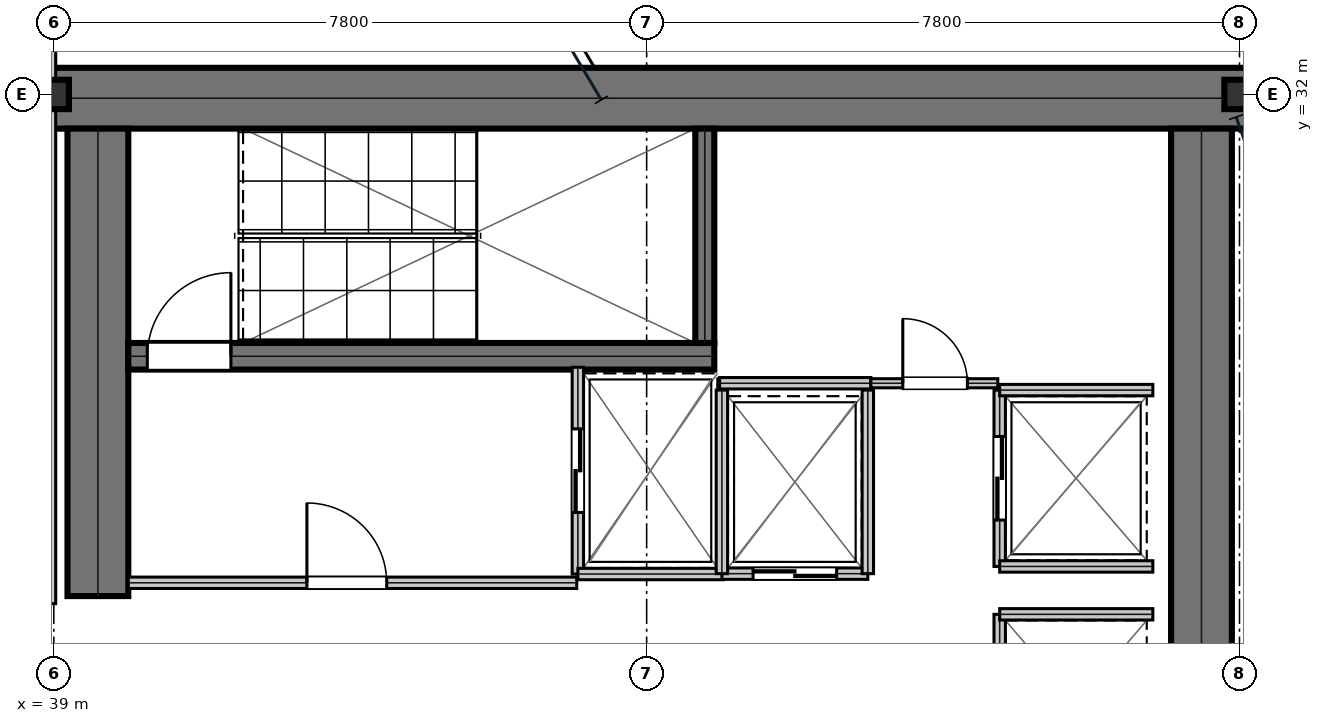
"""IFC4 building model, lengths in metres.
Left out: names, types, materials, properties, quantities, classifications, styles, units other than length and angle.
Written with IfcOpenShell. Run it as: python <this file> out.ifc"""

import sys

from ifc_helpers import new_model, si_unit, direction, frame, frame_2d, origin, origin_2d, place, context, subcontext, project, spatial, rectangle, i_section, extrude, element, fill, save


model = new_model("IFC4")
c1 = context("Model", 3, precision=1e-05, world=origin(), true_north=direction((0.0, 1.0)))
c2 = subcontext(c1, "Body", "Model", "MODEL_VIEW")
j1 = project(units=[si_unit("LENGTHUNIT", "METRE"), si_unit("PLANEANGLEUNIT", "RADIAN")], contexts=[c1])
p1 = place(None, origin())
s1 = spatial("IfcSite", under=j1, at=p1, CompositionType="ELEMENT")
p2 = place(p1, origin())
s2 = spatial("IfcBuilding", under=s1, at=p2, CompositionType="ELEMENT")
p3 = place(p2, frame((0.0, 0.0, 177.6)))
s3 = spatial("IfcBuildingStorey", under=s2, at=p3, CompositionType="ELEMENT", Elevation=177.6)
p4 = place(p3, frame((38.8, 31.95, 0.0), z_axis=(0.0, 0.0, 1.0), x_axis=(1.0, 0.0, 0.0)))
e1 = element("IfcWall", 1, at=p4, inside=s3, PredefinedType="SHEAR", context=c2, shape_type="SweptSolid", body=[
    extrude(rectangle(XDim=16.0, YDim=0.8, at=frame_2d((8.0, 0.0))), origin(), (0.0, 0.0, 1.0), 3.73),
])
p5 = place(p3, frame((39.58, 25.4, 0.0), z_axis=(0.0, 0.0, 1.0), x_axis=(0.0, 1.0, 0.0)))
e2 = element("IfcWall", 2, at=p5, inside=s3, PredefinedType="SHEAR", context=c2, shape_type="SweptSolid", body=[
    extrude(rectangle(XDim=6.15, YDim=0.8, at=frame_2d((3.075, 0.0))), origin(), (0.0, 0.0, 1.0), 3.73),
])
p6 = place(p3, frame((54.1, 16.45, 0.0), z_axis=(0.0, 0.0, 1.0), x_axis=(0.0, 1.0, 0.0)))
e3 = element("IfcWall", 3, at=p6, inside=s3, PredefinedType="SHEAR", context=c2, shape_type="SweptSolid", body=[
    extrude(rectangle(XDim=15.1, YDim=0.8, at=frame_2d((7.55, 0.0))), origin(), (0.0, 0.0, 1.0), 3.73),
])
p7 = place(p3, frame((39.98, 28.555, 0.0), z_axis=(0.0, 0.0, 1.0), x_axis=(1.0, 0.0, 0.0)))
e4 = element("IfcWall", 4, at=p7, inside=s3, PredefinedType="SHEAR", context=c2, shape_type="SweptSolid", body=[
    extrude(rectangle(XDim=7.71, YDim=0.35, at=frame_2d((3.855, 0.0))), origin(), (0.0, 0.0, 1.0), 3.73),
])
p8 = place(p7, frame((0.25, 0.0, 0.0)))
e5 = element("IfcOpeningElement", 5, at=p8, cuts=e4, PredefinedType="OPENING", context=c2, shape_type="SweptSolid", body=[
    extrude(rectangle(XDim=1.1, YDim=2.15, at=frame_2d((0.55, 1.075))), frame((0.0, 0.185, 0.0), z_axis=(0.0, -1.0, 0.0), x_axis=(1.0, 0.0, 0.0)), (0.0, 0.0, 1.0), 0.37),
])
p9 = place(p3, frame((47.565, 28.73, 0.0), z_axis=(0.0, 0.0, 1.0), x_axis=(0.0, 1.0, 0.0)))
e6 = element("IfcWall", 6, at=p9, inside=s3, PredefinedType="SHEAR", context=c2, shape_type="SweptSolid", body=[
    extrude(rectangle(XDim=2.82, YDim=0.25, at=frame_2d((1.41, 0.0))), origin(), (0.0, 0.0, 1.0), 3.73),
])
for number, where, z_axis, x_axis in (
    (7, (39.0, 32.0, 0.0), (0.0, 0.0, 1.0), (1.0, 0.0, 0.0)),
    (8, (54.6, 32.0, 0.0), (0.0, 0.0, 1.0), (1.0, 0.0, 0.0)),
):
    element("IfcColumn", number, at=place(p3, frame(where, z_axis=z_axis, x_axis=x_axis)), inside=s3, PredefinedType="COLUMN", context=c2, shape_type="SweptSolid", body=[
        extrude(i_section(OverallWidth=0.398, OverallDepth=0.387, WebThickness=0.021, FlangeThickness=0.033, at=origin_2d()), origin(), (0.0, 0.0, 1.0), 4.044),
    ])
p10 = place(p3, frame((39.98, 25.575, 0.0), z_axis=(0.0, 0.0, 1.0), x_axis=(1.0, 0.0, 0.0)))
e9 = element("IfcWall", 9, at=p10, inside=s3, PredefinedType="PARTITIONING", context=c2, shape_type="SweptSolid", body=[
    extrude(rectangle(XDim=5.9, YDim=0.15, at=frame_2d((2.95, 0.0))), origin(), (0.0, 0.0, 1.0), 3.73),
])
p11 = place(p10, frame((2.35, 0.0, 0.0)))
e10 = element("IfcOpeningElement", 10, at=p11, cuts=e9, PredefinedType="OPENING", context=c2, shape_type="SweptSolid", body=[
    extrude(rectangle(XDim=1.05, YDim=2.15, at=frame_2d((0.525, 1.075))), frame((0.0, 0.085, 0.0), z_axis=(0.0, -1.0, 0.0), x_axis=(1.0, 0.0, 0.0)), (0.0, 0.0, 1.0), 0.17),
])
p12 = place(p3, frame((45.895, 25.69, 0.0), z_axis=(0.0, 0.0, 1.0), x_axis=(0.0, 1.0, 0.0)))
e11 = element("IfcWall", 11, at=p12, inside=s3, PredefinedType="PARTITIONING", context=c2, shape_type="SweptSolid", body=[
    extrude(rectangle(XDim=2.72, YDim=0.15, at=frame_2d((1.36, 0.0))), origin(), (0.0, 0.0, 1.0), 3.73),
])
p13 = place(p12, frame((0.81, 0.0, 0.0)))
e12 = element("IfcOpeningElement", 12, at=p13, cuts=e11, PredefinedType="OPENING", context=c2, shape_type="SweptSolid", body=[
    extrude(rectangle(XDim=1.1, YDim=2.15, at=frame_2d((0.55, 1.075))), frame((0.0, 0.085, 0.0), z_axis=(0.0, -1.0, 0.0), x_axis=(1.0, 0.0, 0.0)), (0.0, 0.0, 1.0), 0.17),
])
p14 = place(p3, frame((45.895, 25.69, 0.0), z_axis=(0.0, 0.0, 1.0), x_axis=(1.0, 0.0, 0.0)))
e13 = element("IfcWall", 13, at=p14, inside=s3, PredefinedType="PARTITIONING", context=c2, shape_type="SweptSolid", body=[
    extrude(rectangle(XDim=1.915, YDim=0.15, at=frame_2d((0.958, 0.0))), origin(), (0.0, 0.0, 1.0), 3.73),
])
p15 = place(p3, frame((47.79, 25.695, 0.0), z_axis=(0.0, 0.0, 1.0), x_axis=(1.0, 0.0, 0.0)))
e14 = element("IfcWall", 14, at=p15, inside=s3, PredefinedType="PARTITIONING", context=c2, shape_type="SweptSolid", body=[
    extrude(rectangle(XDim=1.92, YDim=0.15, at=frame_2d((0.96, 0.0))), origin(), (0.0, 0.0, 1.0), 3.73),
])
p16 = place(p15, frame((0.41, 0.0, 0.0)))
e15 = element("IfcOpeningElement", 15, at=p16, cuts=e14, PredefinedType="OPENING", context=c2, shape_type="SweptSolid", body=[
    extrude(rectangle(XDim=1.1, YDim=2.15, at=frame_2d((0.55, 1.075))), frame((0.0, 0.085, 0.0), z_axis=(0.0, -1.0, 0.0), x_axis=(1.0, 0.0, 0.0)), (0.0, 0.0, 1.0), 0.17),
])
for number, where, z_axis, x_axis in (
    (16, (47.79, 25.695, 0.0), (0.0, 0.0, 1.0), (0.0, 1.0, 0.0)),
    (17, (49.71, 25.695, 0.0), (0.0, 0.0, 1.0), (0.0, 1.0, 0.0)),
):
    element("IfcWall", number, at=place(p3, frame(where, z_axis=z_axis, x_axis=x_axis)), inside=s3, PredefinedType="PARTITIONING", context=c2, shape_type="SweptSolid", body=[
        extrude(rectangle(XDim=2.415, YDim=0.15, at=frame_2d((1.208, 0.0))), origin(), (0.0, 0.0, 1.0), 3.73),
    ])
p17 = place(p3, frame((51.445, 25.79, 0.0), z_axis=(0.0, 0.0, 1.0), x_axis=(0.0, 1.0, 0.0)))
e18 = element("IfcWall", 18, at=p17, inside=s3, PredefinedType="PARTITIONING", context=c2, shape_type="SweptSolid", body=[
    extrude(rectangle(XDim=2.32, YDim=0.15, at=frame_2d((1.16, 0.0))), origin(), (0.0, 0.0, 1.0), 3.73),
])
p18 = place(p17, frame((0.61, 0.0, 0.0)))
e19 = element("IfcOpeningElement", 19, at=p18, cuts=e18, PredefinedType="OPENING", context=c2, shape_type="SweptSolid", body=[
    extrude(rectangle(XDim=1.1, YDim=2.15, at=frame_2d((0.55, 1.075))), frame((0.0, 0.085, 0.0), z_axis=(0.0, -1.0, 0.0), x_axis=(1.0, 0.0, 0.0)), (0.0, 0.0, 1.0), 0.17),
])
for number, where, z_axis, x_axis in (
    (20, (51.445, 25.79, 0.0), (0.0, 0.0, 1.0), (1.0, 0.0, 0.0)),
    (21, (51.445, 28.11, 0.0), (0.0, 0.0, 1.0), (1.0, 0.0, 0.0)),
):
    element("IfcWall", number, at=place(p3, frame(where, z_axis=z_axis, x_axis=x_axis)), inside=s3, PredefinedType="PARTITIONING", context=c2, shape_type="SweptSolid", body=[
        extrude(rectangle(XDim=2.015, YDim=0.15, at=frame_2d((1.007, 0.0))), origin(), (0.0, 0.0, 1.0), 3.73),
    ])
p19 = place(p3, frame((51.445, 22.84, 0.0), z_axis=(0.0, 0.0, 1.0), x_axis=(0.0, 1.0, 0.0)))
e22 = element("IfcWall", 22, at=p19, inside=s3, PredefinedType="PARTITIONING", context=c2, shape_type="SweptSolid", body=[
    extrude(rectangle(XDim=2.32, YDim=0.15, at=frame_2d((1.16, 0.0))), origin(), (0.0, 0.0, 1.0), 3.73),
])
p20 = place(p3, frame((51.445, 25.16, 0.0), z_axis=(0.0, 0.0, 1.0), x_axis=(1.0, 0.0, 0.0)))
e23 = element("IfcWall", 23, at=p20, inside=s3, PredefinedType="PARTITIONING", context=c2, shape_type="SweptSolid", body=[
    extrude(rectangle(XDim=2.015, YDim=0.15, at=frame_2d((1.007, 0.0))), origin(), (0.0, 0.0, 1.0), 3.73),
])
p21 = place(p3, frame((47.76, 28.2, 0.0), z_axis=(0.0, 0.0, 1.0), x_axis=(1.0, 0.0, 0.0)))
e24 = element("IfcWall", 24, at=p21, inside=s3, PredefinedType="PARTITIONING", context=c2, shape_type="SweptSolid", body=[
    extrude(rectangle(XDim=1.99, YDim=0.15, at=frame_2d((0.995, 0.0))), origin(), (0.0, 0.0, 1.0), 3.73),
])
p22 = place(p3, frame((49.75, 28.2, 0.0), z_axis=(0.0, 0.0, 1.0), x_axis=(1.0, 0.0, 0.0)))
e25 = element("IfcWall", 25, at=p22, inside=s3, PredefinedType="PARTITIONING", context=c2, shape_type="SweptSolid", body=[
    extrude(rectangle(XDim=1.67, YDim=0.12, at=frame_2d((0.835, 0.0))), origin(), (0.0, 0.0, 1.0), 3.73),
])
p23 = place(p22, frame((0.42, 0.0, 0.0)))
e26 = element("IfcOpeningElement", 26, at=p23, cuts=e25, PredefinedType="OPENING", context=c2, shape_type="SweptSolid", body=[
    extrude(rectangle(XDim=0.85, YDim=2.15, at=frame_2d((0.425, 1.075))), frame((0.0, 0.07, 0.0), z_axis=(0.0, -1.0, 0.0), x_axis=(1.0, 0.0, 0.0)), (0.0, 0.0, 1.0), 0.14),
])
p24 = place(p3, frame((38.95, 25.3, 0.0), z_axis=(0.0, 0.0, 1.0), x_axis=(0.0, 1.0, 0.0)))
e27 = element("IfcWall", 27, at=p24, inside=s3, PredefinedType="PARTITIONING", context=c2, shape_type="SweptSolid", body=[
    extrude(rectangle(XDim=8.2, YDim=0.15, at=frame_2d((4.1, 0.0))), origin(), (0.0, 0.0, 1.0), 3.11),
])
p25 = place(p11, origin())
e28 = element("IfcDoor", 28, at=p25, inside=s3, OperationType="SINGLE_SWING_LEFT", PredefinedType="DOOR", context=c2, shape_type="SweptSolid", body=[
    extrude(rectangle(XDim=1.05, YDim=2.15, at=frame_2d((0.525, 1.075))), frame((0.0, 0.025, 0.0), z_axis=(0.0, -1.0, 0.0), x_axis=(1.0, 0.0, 0.0)), (0.0, 0.0, 1.0), 0.05),
])
fill(e10, e28)
p26 = place(p13, frame((1.1, 0.0, 0.0), z_axis=(0.0, 0.0, 1.0), x_axis=(-1.0, 0.0, 0.0)))
e29 = element("IfcDoor", 29, at=p26, inside=s3, OperationType="DOUBLE_DOOR_SLIDING", PredefinedType="DOOR", context=c2, shape_type="SweptSolid", body=[
    extrude(rectangle(XDim=1.1, YDim=2.15, at=frame_2d((0.55, 1.075))), frame((0.0, 0.025, 0.0), z_axis=(0.0, -1.0, 0.0), x_axis=(1.0, 0.0, 0.0)), (0.0, 0.0, 1.0), 0.05),
])
fill(e12, e29)
p27 = place(p16, frame((1.1, 0.0, 0.0), z_axis=(0.0, 0.0, 1.0), x_axis=(-1.0, 0.0, 0.0)))
e30 = element("IfcDoor", 30, at=p27, inside=s3, OperationType="DOUBLE_DOOR_SLIDING", PredefinedType="DOOR", context=c2, shape_type="SweptSolid", body=[
    extrude(rectangle(XDim=1.1, YDim=2.15, at=frame_2d((0.55, 1.075))), frame((0.0, 0.025, 0.0), z_axis=(0.0, -1.0, 0.0), x_axis=(1.0, 0.0, 0.0)), (0.0, 0.0, 1.0), 0.05),
])
fill(e15, e30)
p28 = place(p18, frame((1.1, 0.0, 0.0), z_axis=(0.0, 0.0, 1.0), x_axis=(-1.0, 0.0, 0.0)))
e31 = element("IfcDoor", 31, at=p28, inside=s3, OperationType="DOUBLE_DOOR_SLIDING", PredefinedType="DOOR", context=c2, shape_type="SweptSolid", body=[
    extrude(rectangle(XDim=1.1, YDim=2.15, at=frame_2d((0.55, 1.075))), frame((0.0, 0.025, 0.0), z_axis=(0.0, -1.0, 0.0), x_axis=(1.0, 0.0, 0.0)), (0.0, 0.0, 1.0), 0.05),
])
fill(e19, e31)
p29 = place(p23, origin())
e32 = element("IfcDoor", 32, at=p29, inside=s3, OperationType="SINGLE_SWING_LEFT", PredefinedType="DOOR", context=c2, shape_type="SweptSolid", body=[
    extrude(rectangle(XDim=0.85, YDim=2.15, at=frame_2d((0.425, 1.075))), frame((0.0, 0.025, 0.0), z_axis=(0.0, -1.0, 0.0), x_axis=(1.0, 0.0, 0.0)), (0.0, 0.0, 1.0), 0.05),
])
fill(e26, e32)
p30 = place(p8, origin())
e33 = element("IfcDoor", 33, at=p30, inside=s3, OperationType="SINGLE_SWING_RIGHT", PredefinedType="DOOR", context=c2, shape_type="SweptSolid", body=[
    extrude(rectangle(XDim=1.1, YDim=2.15, at=frame_2d((0.55, 1.075))), frame((0.0, 0.025, 0.0), z_axis=(0.0, -1.0, 0.0), x_axis=(1.0, 0.0, 0.0)), (0.0, 0.0, 1.0), 0.05),
])
fill(e5, e33)
save(model, sys.argv[1])
